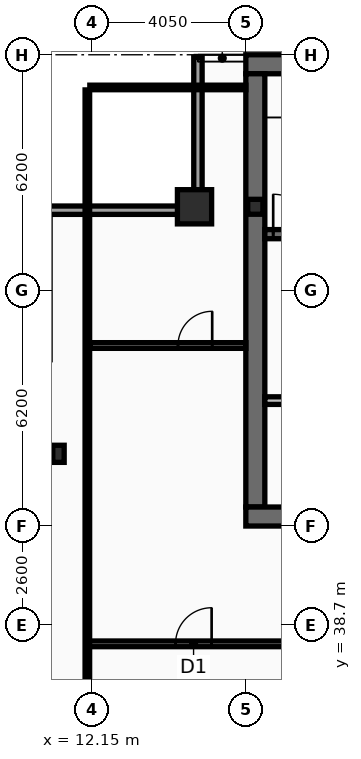
"""IFC4 building model, lengths in metres.
Left out: names, types, materials, properties, quantities, classifications, styles, units other than length and angle.
Written with IfcOpenShell. Run it as: python <this file> out.ifc"""

import sys

from ifc_helpers import new_model, si_unit, direction, frame, frame_2d, origin, origin_2d, place, context, subcontext, project, spatial, rectangle, hollow_rectangle, i_section, extrude, element, fill, save


model = new_model("IFC4")
c1 = context("Model", 3, precision=1e-05, world=origin(), true_north=direction((0.0, 1.0)))
c2 = subcontext(c1, "Body", "Model", "MODEL_VIEW")
j1 = project(units=[si_unit("LENGTHUNIT", "METRE"), si_unit("PLANEANGLEUNIT", "RADIAN")], contexts=[c1])
p1 = place(None, origin())
s1 = spatial("IfcSite", under=j1, at=p1, CompositionType="ELEMENT")
p2 = place(p1, origin())
s2 = spatial("IfcBuilding", under=s1, at=p2, CompositionType="ELEMENT")
p3 = place(p2, frame((0.0, 0.0, 343.4)))
s3 = spatial("IfcBuildingStorey", under=s2, at=p3, CompositionType="ELEMENT", Elevation=343.4)
p4 = place(p3, frame((16.2, 53.45, 0.0), z_axis=(0.0, 0.0, 1.0), x_axis=(1.0, 0.0, 0.0)))
e1 = element("IfcWall", 1, at=p4, inside=s3, PredefinedType="SHEAR", context=c2, shape_type="SweptSolid", body=[
    extrude(rectangle(XDim=40.5, YDim=0.5, at=frame_2d((20.25, 0.0))), origin(), (0.0, 0.0, 1.0), 3.44),
])
p5 = place(p3, frame((16.45, 41.8, 0.0), z_axis=(0.0, 0.0, 1.0), x_axis=(0.0, 1.0, 0.0)))
e2 = element("IfcWall", 2, at=p5, inside=s3, PredefinedType="SHEAR", context=c2, shape_type="SweptSolid", body=[
    extrude(rectangle(XDim=11.4, YDim=0.5, at=frame_2d((5.7, 0.0))), origin(), (0.0, 0.0, 1.0), 3.44),
])
p6 = place(p3, frame((18.65, 41.55, 0.0), z_axis=(0.0, 0.0, 1.0), x_axis=(-1.0, 0.0, 0.0)))
e3 = element("IfcWall", 3, at=p6, inside=s3, PredefinedType="SHEAR", context=c2, shape_type="SweptSolid", body=[
    extrude(rectangle(XDim=2.45, YDim=0.5, at=frame_2d((1.225, 0.0))), origin(), (0.0, 0.0, 1.0), 3.44),
])
p7 = place(p3, frame((16.7, 48.98, 0.0), z_axis=(0.0, 0.0, 1.0), x_axis=(1.0, 0.0, 0.0)))
e4 = element("IfcWall", 4, at=p7, inside=s3, PredefinedType="SHEAR", context=c2, shape_type="SweptSolid", body=[
    extrude(rectangle(XDim=7.52, YDim=0.24, at=frame_2d((3.76, 0.0))), origin(), (0.0, 0.0, 1.0), 3.44),
])
p8 = place(p7, frame((0.22, 0.0, 0.0)))
e5 = element("IfcOpeningElement", 5, at=p8, cuts=e4, PredefinedType="OPENING", context=c2, shape_type="SweptSolid", body=[
    extrude(rectangle(XDim=1.05, YDim=2.15, at=frame_2d((0.525, 1.075))), frame((0.0, 0.13, 0.0), z_axis=(0.0, -1.0, 0.0), x_axis=(1.0, 0.0, 0.0)), (0.0, 0.0, 1.0), 0.26),
])
p9 = place(p3, frame((14.85, 49.7, 0.0), z_axis=(0.0, 0.0, 1.0), x_axis=(1.0, 0.0, 0.0)))
e6 = element("IfcColumn", 6, at=p9, inside=s3, PredefinedType="COLUMN", context=c2, shape_type="SweptSolid", body=[
    extrude(hollow_rectangle(XDim=0.9, YDim=0.9, WallThickness=0.05, at=origin_2d()), origin(), (0.0, 0.0, 1.0), 3.6),
])
p10 = place(p3, frame((11.27, 43.2, 0.0), z_axis=(0.0, 0.0, 1.0), x_axis=(1.0, 0.0, 0.0)))
e7 = element("IfcColumn", 7, at=p10, inside=s3, PredefinedType="COLUMN", context=c2, shape_type="SweptSolid", body=[
    extrude(i_section(OverallWidth=0.3, OverallDepth=0.45, WebThickness=0.014, FlangeThickness=0.026, at=origin_2d()), origin(), (0.0, 0.0, 1.0), 3.6),
])
p11 = place(p3, frame((16.45, 49.7, 0.0), z_axis=(0.0, 0.0, 1.0), x_axis=(1.0, 0.0, 0.0)))
e8 = element("IfcColumn", 8, at=p11, inside=s3, PredefinedType="COLUMN", context=c2, shape_type="SweptSolid", body=[
    extrude(i_section(OverallWidth=0.399, OverallDepth=0.393, WebThickness=0.023, FlangeThickness=0.037, at=origin_2d()), origin(), (0.0, 0.0, 1.0), 3.6),
])
p12 = place(p3, frame((10.83, 49.61, 0.0), z_axis=(0.0, 0.0, 1.0), x_axis=(1.0, 0.0, 0.0)))
e9 = element("IfcWall", 9, at=p12, inside=s3, PredefinedType="SOLIDWALL", context=c2, shape_type="SweptSolid", body=[
    extrude(rectangle(XDim=4.22, YDim=0.22, at=frame_2d((2.11, 0.0))), origin(), (0.0, 0.0, 1.0), 2.88),
])
p13 = place(p3, frame((14.94, 49.72, 0.0), z_axis=(0.0, 0.0, 1.0), x_axis=(0.0, 1.0, 0.0)))
e10 = element("IfcWall", 10, at=p13, inside=s3, PredefinedType="SOLIDWALL", context=c2, shape_type="SweptSolid", body=[
    extrude(rectangle(XDim=3.91, YDim=0.22, at=frame_2d((1.955, 0.0))), origin(), (0.0, 0.0, 1.0), 2.88),
])
p14 = place(p3, frame((16.7, 44.6, 0.0), z_axis=(0.0, 0.0, 1.0), x_axis=(1.0, 0.0, 0.0)))
e11 = element("IfcWall", 11, at=p14, inside=s3, PredefinedType="PARTITIONING", context=c2, shape_type="SweptSolid", body=[
    extrude(rectangle(XDim=4.3, YDim=0.2, at=frame_2d((2.15, 0.0))), origin(), (0.0, 0.0, 1.0), 3.44),
])
p15 = place(p14, frame((1.25, 0.0, 0.0)))
e12 = element("IfcOpeningElement", 12, at=p15, cuts=e11, PredefinedType="OPENING", context=c2, shape_type="SweptSolid", body=[
    extrude(rectangle(XDim=1.05, YDim=2.15, at=frame_2d((0.525, 1.075))), frame((0.0, 0.11, 0.0), z_axis=(0.0, -1.0, 0.0), x_axis=(1.0, 0.0, 0.0)), (0.0, 0.0, 1.0), 0.22),
])
p16 = place(p3, frame((12.03, 38.2, 0.0), z_axis=(0.0, 0.0, 1.0), x_axis=(1.0, 0.0, 0.0)))
e13 = element("IfcWall", 13, at=p16, inside=s3, PredefinedType="PARTITIONING", context=c2, shape_type="SweptSolid", body=[
    extrude(rectangle(XDim=6.52, YDim=0.15, at=frame_2d((3.26, 0.0))), origin(), (0.0, 0.0, 1.0), 2.83),
])
p17 = place(p16, frame((2.32, 0.0, 0.0)))
e14 = element("IfcOpeningElement", 14, at=p17, cuts=e13, PredefinedType="OPENING", context=c2, shape_type="SweptSolid", body=[
    extrude(rectangle(XDim=0.95, YDim=2.05, at=frame_2d((0.475, 1.025))), frame((0.0, 0.085, 0.0), z_axis=(0.0, -1.0, 0.0), x_axis=(1.0, 0.0, 0.0)), (0.0, 0.0, 1.0), 0.17),
])
p18 = place(p3, frame((12.095, 46.05, 0.0), z_axis=(0.0, 0.0, 1.0), x_axis=(1.0, 0.0, 0.0)))
e15 = element("IfcWall", 15, at=p18, inside=s3, PredefinedType="PARTITIONING", context=c2, shape_type="SweptSolid", body=[
    extrude(rectangle(XDim=4.105, YDim=0.15, at=frame_2d((2.052, 0.0))), origin(), (0.0, 0.0, 1.0), 2.88),
])
p19 = place(p18, frame((2.32, 0.0, 0.0)))
e16 = element("IfcOpeningElement", 16, at=p19, cuts=e15, PredefinedType="OPENING", context=c2, shape_type="SweptSolid", body=[
    extrude(rectangle(XDim=0.9, YDim=2.05, at=frame_2d((0.45, 1.025))), frame((0.0, 0.085, 0.0), z_axis=(0.0, -1.0, 0.0), x_axis=(1.0, 0.0, 0.0)), (0.0, 0.0, 1.0), 0.17),
])
p20 = place(p3, frame((12.03, 10.665, 0.0), z_axis=(0.0, 0.0, 1.0), x_axis=(0.0, 1.0, 0.0)))
e17 = element("IfcWall", 17, at=p20, inside=s3, PredefinedType="PARTITIONING", context=c2, shape_type="SweptSolid", body=[
    extrude(rectangle(XDim=42.11, YDim=0.12, at=frame_2d((21.055, 0.0))), origin(), (0.0, 0.0, 1.0), 2.83),
])
p21 = place(p3, frame((12.095, 52.84, 0.0), z_axis=(0.0, 0.0, 1.0), x_axis=(1.0, 0.0, 0.0)))
e18 = element("IfcWall", 18, at=p21, inside=s3, PredefinedType="PARTITIONING", context=c2, shape_type="SweptSolid", body=[
    extrude(rectangle(XDim=4.105, YDim=0.12, at=frame_2d((2.052, 0.0))), origin(), (0.0, 0.0, 1.0), 3.44),
])
p22 = place(p8, origin())
e19 = element("IfcDoor", 19, at=p22, inside=s3, OperationType="SINGLE_SWING_LEFT", PredefinedType="DOOR", context=c2, shape_type="SweptSolid", body=[
    extrude(rectangle(XDim=1.05, YDim=2.15, at=frame_2d((0.525, 1.075))), frame((0.0, 0.025, 0.0), z_axis=(0.0, -1.0, 0.0), x_axis=(1.0, 0.0, 0.0)), (0.0, 0.0, 1.0), 0.05),
])
fill(e5, e19)
p23 = place(p17, origin())
e20 = element("IfcDoor", 20, at=p23, inside=s3, OperationType="SINGLE_SWING_RIGHT", PredefinedType="DOOR", context=c2, shape_type="SweptSolid", body=[
    extrude(rectangle(XDim=0.95, YDim=2.05, at=frame_2d((0.475, 1.025))), frame((0.0, 0.025, 0.0), z_axis=(0.0, -1.0, 0.0), x_axis=(1.0, 0.0, 0.0)), (0.0, 0.0, 1.0), 0.05),
])
fill(e14, e20)
p24 = place(p19, origin())
e21 = element("IfcDoor", 21, at=p24, inside=s3, OperationType="SINGLE_SWING_RIGHT", PredefinedType="DOOR", context=c2, shape_type="SweptSolid", body=[
    extrude(rectangle(XDim=0.9, YDim=2.05, at=frame_2d((0.45, 1.025))), frame((0.0, 0.025, 0.0), z_axis=(0.0, -1.0, 0.0), x_axis=(1.0, 0.0, 0.0)), (0.0, 0.0, 1.0), 0.05),
])
fill(e16, e21)
save(model, sys.argv[1])
